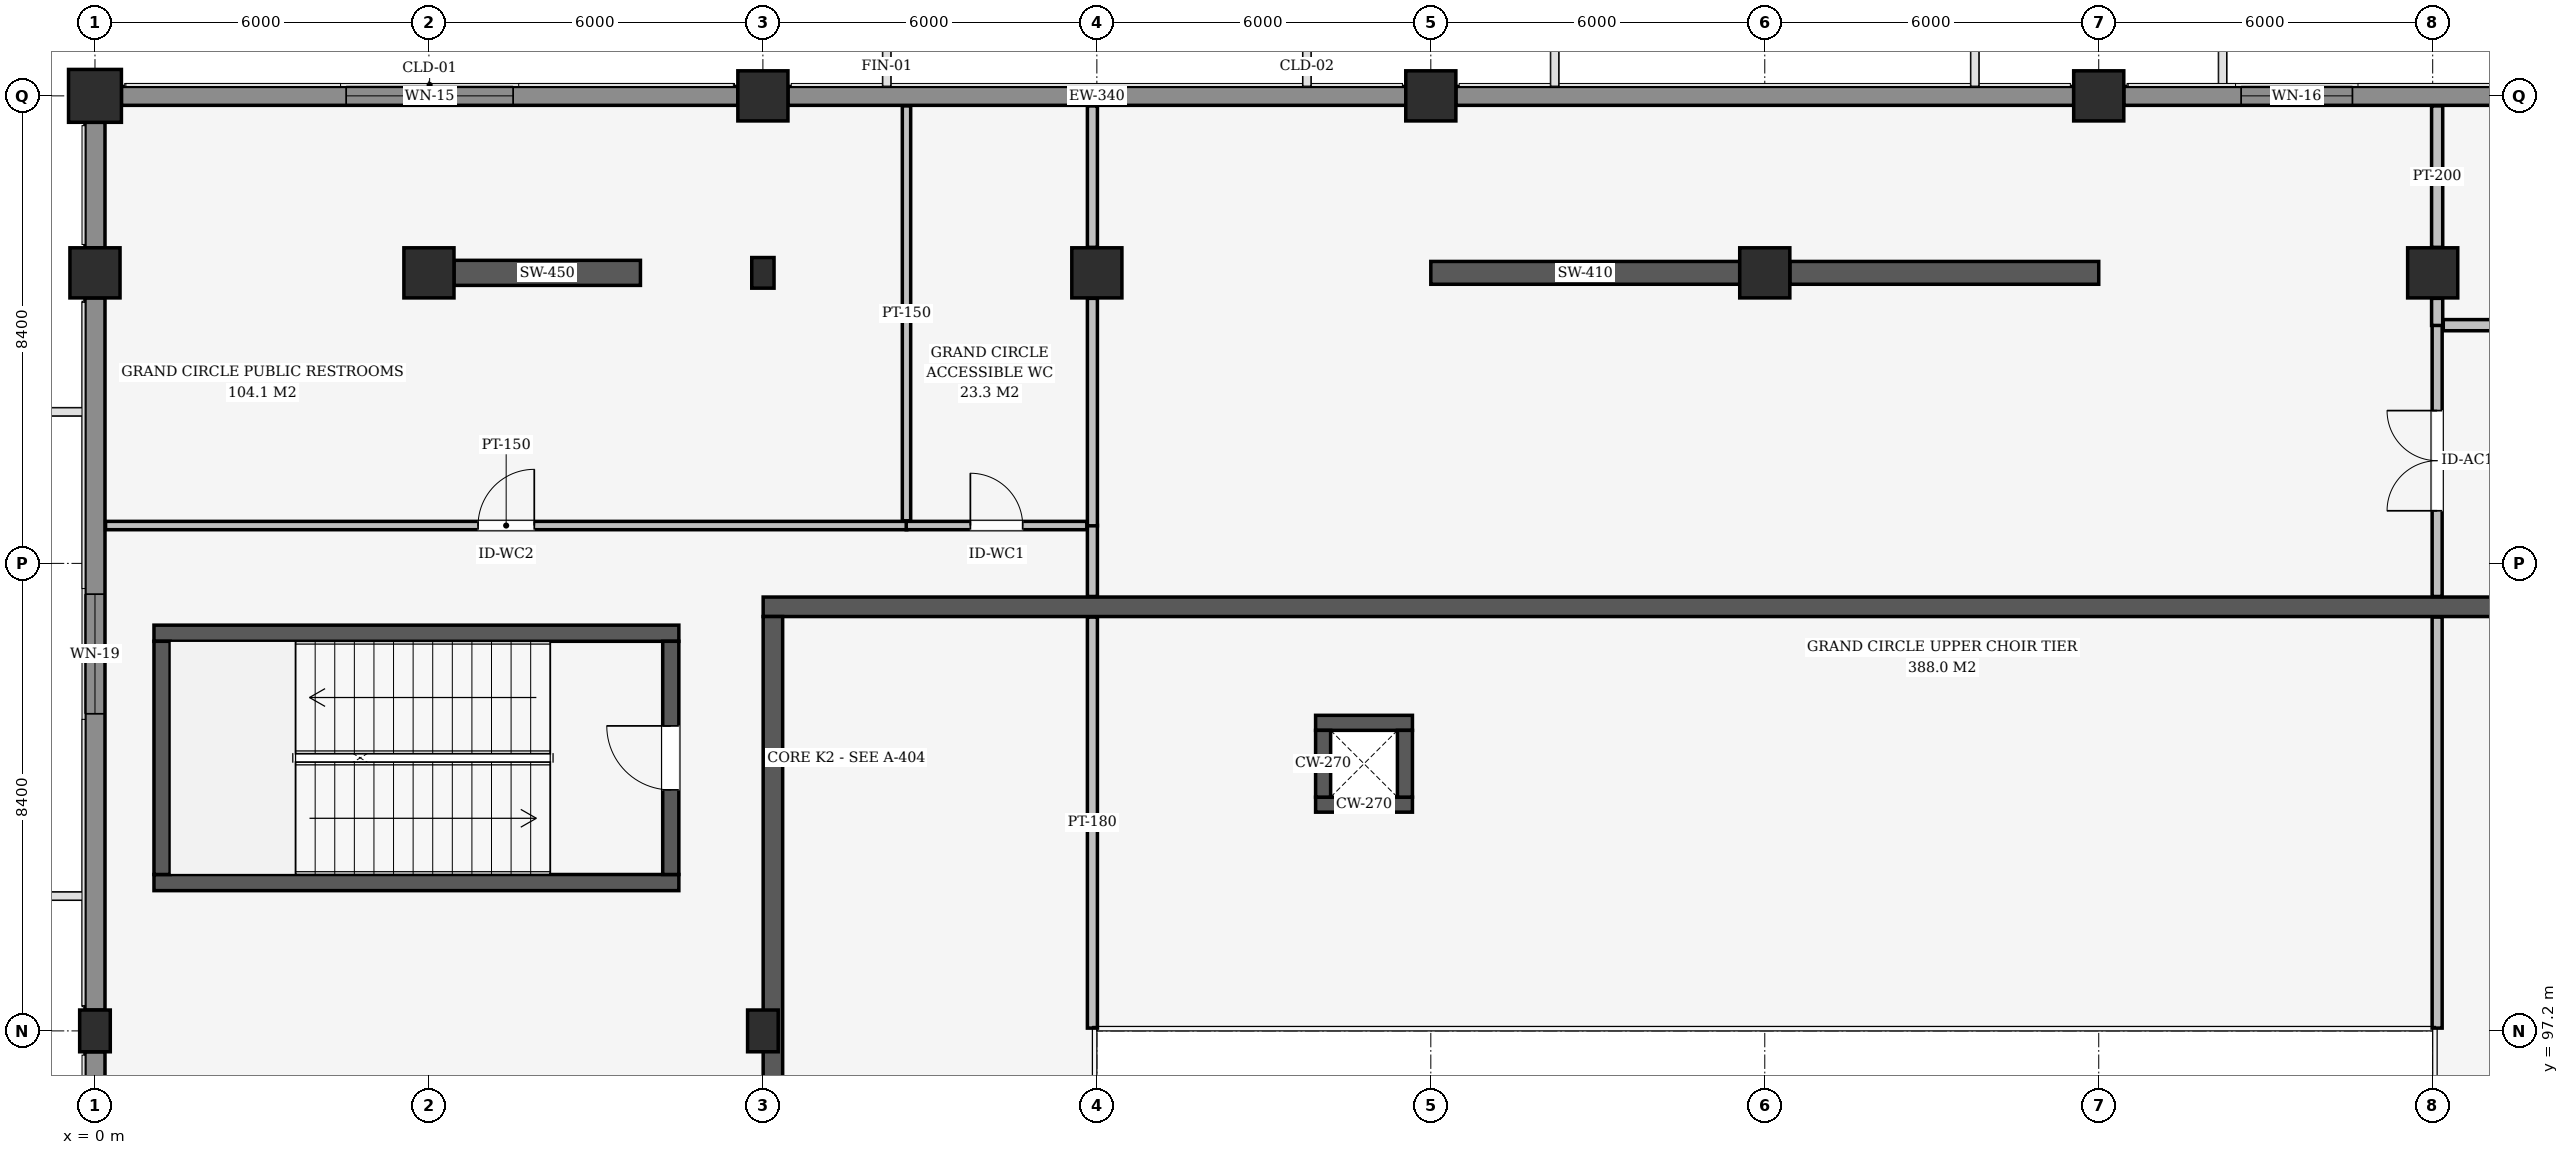
"""IFC4 building model, lengths in metres.
Left out: names, types, materials, properties, quantities, classifications, styles, units other than length and angle.
Written with IfcOpenShell. Run it as: python <this file> out.ifc"""

import sys

from ifc_helpers import new_model, si_unit, direction, frame, frame_2d, origin, origin_2d, place, context, subcontext, project, spatial, rectangle, extrude, element, fill, save


model = new_model("IFC4")
c1 = context("Model", 3, precision=1e-05, world=origin(), true_north=direction((0.0, 1.0)))
c2 = subcontext(c1, "Body", "Model", "MODEL_VIEW")
j1 = project(units=[si_unit("LENGTHUNIT", "METRE"), si_unit("PLANEANGLEUNIT", "RADIAN")], contexts=[c1])
p1 = place(None, origin())
s1 = spatial("IfcSite", under=j1, at=p1, CompositionType="ELEMENT")
p2 = place(p1, origin())
s2 = spatial("IfcBuilding", under=s1, at=p2, CompositionType="ELEMENT")
p3 = place(p2, frame((0.0, 0.0, 9.3)))
s3 = spatial("IfcBuildingStorey", under=s2, at=p3, CompositionType="ELEMENT", Elevation=9.3)
p4 = place(p3, frame((0.0, 114.0, 0.0), z_axis=(0.0, 0.0, 1.0), x_axis=(1.0, 0.0, 0.0)))
e1 = element("IfcColumn", 1, at=p4, inside=s3, PredefinedType="COLUMN", context=c2, shape_type="SweptSolid", body=[
    extrude(rectangle(XDim=0.95, YDim=0.95, at=origin_2d()), origin(), (0.0, 0.0, 1.0), 4.5),
])
for number, where, z_axis, x_axis in (
    (2, (12.0, 114.0, 0.0), (0.0, 0.0, 1.0), (1.0, 0.0, 0.0)),
    (3, (24.0, 114.0, 0.0), (0.0, 0.0, 1.0), (1.0, 0.0, 0.0)),
    (4, (36.0, 114.0, 0.0), (0.0, 0.0, 1.0), (1.0, 0.0, 0.0)),
    (5, (0.0, 110.82, 0.0), (0.0, 0.0, 1.0), (1.0, 0.0, 0.0)),
    (6, (6.0, 110.82, 0.0), (0.0, 0.0, 1.0), (1.0, 0.0, 0.0)),
    (7, (18.0, 110.82, 0.0), (0.0, 0.0, 1.0), (1.0, 0.0, 0.0)),
    (8, (30.0, 110.82, 0.0), (0.0, 0.0, 1.0), (1.0, 0.0, 0.0)),
    (9, (42.0, 110.82, 0.0), (0.0, 0.0, 1.0), (1.0, 0.0, 0.0)),
):
    element("IfcColumn", number, at=place(p3, frame(where, z_axis=z_axis, x_axis=x_axis)), inside=s3, PredefinedType="COLUMN", context=c2, shape_type="SweptSolid", body=[
        extrude(rectangle(XDim=0.9, YDim=0.9, at=origin_2d()), origin(), (0.0, 0.0, 1.0), 4.5),
    ])
for number, where, z_axis, x_axis in (
    (10, (0.0, 97.2, 0.0), (0.0, 0.0, 1.0), (1.0, 0.0, 0.0)),
    (11, (12.0, 97.2, 0.0), (0.0, 0.0, 1.0), (1.0, 0.0, 0.0)),
):
    element("IfcColumn", number, at=place(p3, frame(where, z_axis=z_axis, x_axis=x_axis)), inside=s3, PredefinedType="COLUMN", context=c2, shape_type="SweptSolid", body=[
        extrude(rectangle(XDim=0.55, YDim=0.75, at=origin_2d()), origin(), (0.0, 0.0, 1.0), 4.5),
    ])
p5 = place(p3, frame((12.0, 110.82, 0.0), z_axis=(0.0, 0.0, 1.0), x_axis=(1.0, 0.0, 0.0)))
e12 = element("IfcColumn", 12, at=p5, inside=s3, PredefinedType="PILASTER", context=c2, shape_type="SweptSolid", body=[
    extrude(rectangle(XDim=0.4, YDim=0.55, at=origin_2d()), origin(), (0.0, 0.0, 1.0), 4.5),
])
p6 = place(p3, frame((12.005, 104.82, 0.0), z_axis=(0.0, 0.0, 1.0), x_axis=(1.0, 0.0, 0.0)))
e13 = element("IfcWall", 13, at=p6, inside=s3, PredefinedType="SHEAR", context=c2, shape_type="SweptSolid", body=[
    extrude(rectangle(XDim=35.99, YDim=0.35, at=frame_2d((17.995, 0.0))), origin(), (0.0, 0.0, 1.0), 4.2),
])
p7 = place(p3, frame((12.18, 74.755, 0.0), z_axis=(0.0, 0.0, 1.0), x_axis=(0.0, 1.0, 0.0)))
e14 = element("IfcWall", 14, at=p7, inside=s3, PredefinedType="SHEAR", context=c2, shape_type="SweptSolid", body=[
    extrude(rectangle(XDim=29.89, YDim=0.35, at=frame_2d((14.945, 0.0))), origin(), (0.0, 0.0, 1.0), 4.2),
])
p8 = place(p3, frame((6.45, 110.82, 0.0), z_axis=(0.0, 0.0, 1.0), x_axis=(1.0, 0.0, 0.0)))
e15 = element("IfcWall", 15, at=p8, inside=s3, PredefinedType="SHEAR", context=c2, shape_type="SweptSolid", body=[
    extrude(rectangle(XDim=3.35, YDim=0.45, at=frame_2d((1.675, 0.0))), origin(), (0.0, 0.0, 1.0), 3.505),
])
for number, where, z_axis, x_axis in (
    (16, (24.0, 110.82, 0.0), (0.0, 0.0, 1.0), (1.0, 0.0, 0.0)),
    (17, (30.45, 110.82, 0.0), (0.0, 0.0, 1.0), (1.0, 0.0, 0.0)),
):
    element("IfcWall", number, at=place(p3, frame(where, z_axis=z_axis, x_axis=x_axis)), inside=s3, PredefinedType="SHEAR", context=c2, shape_type="SweptSolid", body=[
        extrude(rectangle(XDim=5.55, YDim=0.41, at=frame_2d((2.775, 0.0))), origin(), (0.0, 0.0, 1.0), 3.505),
    ])
p9 = place(p3, frame((0.475, 114.0, 0.0), z_axis=(0.0, 0.0, 1.0), x_axis=(1.0, 0.0, 0.0)))
e18 = element("IfcWall", 18, at=p9, inside=s3, PredefinedType="SOLIDWALL", context=c2, shape_type="SweptSolid", body=[
    extrude(rectangle(XDim=11.075, YDim=0.34, at=frame_2d((5.538, 0.0))), origin(), (0.0, 0.0, 1.0), 3.569),
])
p10 = place(p9, frame((4.038, 0.0, 0.6)))
e19 = element("IfcOpeningElement", 19, at=p10, cuts=e18, PredefinedType="OPENING", context=c2, shape_type="SweptSolid", body=[
    extrude(rectangle(XDim=3.0, YDim=2.1, at=frame_2d((1.5, 1.05))), frame((0.0, 0.18, 0.0), z_axis=(0.0, -1.0, 0.0), x_axis=(1.0, 0.0, 0.0)), (0.0, 0.0, 1.0), 0.36),
])
for number, where, z_axis, x_axis in (
    (20, (12.45, 114.0, 0.0), (0.0, 0.0, 1.0), (1.0, 0.0, 0.0)),
    (21, (24.45, 114.0, 0.0), (0.0, 0.0, 1.0), (1.0, 0.0, 0.0)),
):
    element("IfcWall", number, at=place(p3, frame(where, z_axis=z_axis, x_axis=x_axis)), inside=s3, PredefinedType="SOLIDWALL", context=c2, shape_type="SweptSolid", body=[
        extrude(rectangle(XDim=11.1, YDim=0.34, at=frame_2d((5.55, 0.0))), origin(), (0.0, 0.0, 1.0), 3.569),
    ])
p11 = place(p3, frame((36.45, 114.0, 0.0), z_axis=(0.0, 0.0, 1.0), x_axis=(1.0, 0.0, 0.0)))
e22 = element("IfcWall", 22, at=p11, inside=s3, PredefinedType="SOLIDWALL", context=c2, shape_type="SweptSolid", body=[
    extrude(rectangle(XDim=11.1, YDim=0.34, at=frame_2d((5.55, 0.0))), origin(), (0.0, 0.0, 1.0), 3.569),
])
p12 = place(p11, frame((2.108, 0.0, 0.85)))
e23 = element("IfcOpeningElement", 23, at=p12, cuts=e22, PredefinedType="OPENING", context=c2, shape_type="SweptSolid", body=[
    extrude(rectangle(XDim=2.0, YDim=1.85, at=frame_2d((1.0, 0.925))), frame((0.0, 0.18, 0.0), z_axis=(0.0, -1.0, 0.0), x_axis=(1.0, 0.0, 0.0)), (0.0, 0.0, 1.0), 0.36),
])
p13 = place(p3, frame((0.0, 83.175, 0.0), z_axis=(0.0, 0.0, 1.0), x_axis=(0.0, 1.0, 0.0)))
e24 = element("IfcWall", 24, at=p13, inside=s3, PredefinedType="SOLIDWALL", context=c2, shape_type="SweptSolid", body=[
    extrude(rectangle(XDim=13.65, YDim=0.36, at=frame_2d((6.825, 0.0))), origin(), (0.0, 0.0, 1.0), 3.569),
])
p14 = place(p3, frame((0.0, 97.575, 0.0), z_axis=(0.0, 0.0, 1.0), x_axis=(0.0, 1.0, 0.0)))
e25 = element("IfcWall", 25, at=p14, inside=s3, PredefinedType="SOLIDWALL", context=c2, shape_type="SweptSolid", body=[
    extrude(rectangle(XDim=12.795, YDim=0.36, at=frame_2d((6.397, 0.0))), origin(), (0.0, 0.0, 1.0), 3.569),
])
p15 = place(p14, frame((5.323, 0.0, 0.85)))
e26 = element("IfcOpeningElement", 26, at=p15, cuts=e25, PredefinedType="OPENING", context=c2, shape_type="SweptSolid", body=[
    extrude(rectangle(XDim=2.15, YDim=1.55, at=frame_2d((1.075, 0.775))), frame((0.0, 0.19, 0.0), z_axis=(0.0, -1.0, 0.0), x_axis=(1.0, 0.0, 0.0)), (0.0, 0.0, 1.0), 0.38),
])
p16 = place(p3, frame((0.0, 111.27, 0.0), z_axis=(0.0, 0.0, 1.0), x_axis=(0.0, 1.0, 0.0)))
e27 = element("IfcWall", 27, at=p16, inside=s3, PredefinedType="SOLIDWALL", context=c2, shape_type="SweptSolid", body=[
    extrude(rectangle(XDim=2.255, YDim=0.36, at=frame_2d((1.127, 0.0))), origin(), (0.0, 0.0, 1.0), 3.568),
])
for number, where, z_axis, x_axis in (
    (28, (21.93, 101.265, 0.0), (0.0, 0.0, 1.0), (1.0, 0.0, 0.0)),
    (29, (21.93, 102.735, 0.0), (0.0, 0.0, 1.0), (1.0, 0.0, 0.0)),
):
    element("IfcWall", number, at=place(p3, frame(where, z_axis=z_axis, x_axis=x_axis)), inside=s3, PredefinedType="SHEAR", context=c2, shape_type="SweptSolid", body=[
        extrude(rectangle(XDim=1.74, YDim=0.27, at=frame_2d((0.87, 0.0))), origin(), (0.0, 0.0, 1.0), 4.2),
    ])
for number, where, z_axis, x_axis in (
    (30, (22.065, 101.4, 0.0), (0.0, 0.0, 1.0), (0.0, 1.0, 0.0)),
    (31, (23.535, 101.4, 0.0), (0.0, 0.0, 1.0), (0.0, 1.0, 0.0)),
):
    element("IfcWall", number, at=place(p3, frame(where, z_axis=z_axis, x_axis=x_axis)), inside=s3, PredefinedType="SHEAR", context=c2, shape_type="SweptSolid", body=[
        extrude(rectangle(XDim=1.2, YDim=0.27, at=frame_2d((0.6, 0.0))), origin(), (0.0, 0.0, 1.0), 4.2),
    ])
for number, where, z_axis, x_axis in (
    (32, (1.06, 99.865, 0.0), (0.0, 0.0, 1.0), (1.0, 0.0, 0.0)),
    (33, (1.06, 104.345, 0.0), (0.0, 0.0, 1.0), (1.0, 0.0, 0.0)),
):
    element("IfcWall", number, at=place(p3, frame(where, z_axis=z_axis, x_axis=x_axis)), inside=s3, PredefinedType="SHEAR", context=c2, shape_type="SweptSolid", body=[
        extrude(rectangle(XDim=9.43, YDim=0.29, at=frame_2d((4.715, 0.0))), origin(), (0.0, 0.0, 1.0), 4.2),
    ])
p17 = place(p3, frame((1.205, 100.01, 0.0), z_axis=(0.0, 0.0, 1.0), x_axis=(0.0, 1.0, 0.0)))
e34 = element("IfcWall", 34, at=p17, inside=s3, PredefinedType="SHEAR", context=c2, shape_type="SweptSolid", body=[
    extrude(rectangle(XDim=4.19, YDim=0.29, at=frame_2d((2.095, 0.0))), origin(), (0.0, 0.0, 1.0), 4.2),
])
p18 = place(p3, frame((10.345, 100.01, 0.0), z_axis=(0.0, 0.0, 1.0), x_axis=(0.0, 1.0, 0.0)))
e35 = element("IfcWall", 35, at=p18, inside=s3, PredefinedType="SHEAR", context=c2, shape_type="SweptSolid", body=[
    extrude(rectangle(XDim=4.19, YDim=0.29, at=frame_2d((2.095, 0.0))), origin(), (0.0, 0.0, 1.0), 4.2),
])
p19 = place(p18, frame((1.52, 0.0, 0.0)))
e36 = element("IfcOpeningElement", 36, at=p19, cuts=e35, PredefinedType="OPENING", context=c2, shape_type="SweptSolid", body=[
    extrude(rectangle(XDim=1.15, YDim=2.15, at=frame_2d((0.575, 1.075))), frame((0.0, 0.155, 0.0), z_axis=(0.0, -1.0, 0.0), x_axis=(1.0, 0.0, 0.0)), (0.0, 0.0, 1.0), 0.31),
])
p20 = place(p3, frame((17.92, 97.25, 0.0), z_axis=(0.0, 0.0, 1.0), x_axis=(0.0, 1.0, 0.0)))
e37 = element("IfcWall", 37, at=p20, inside=s3, PredefinedType="PARTITIONING", context=c2, shape_type="SweptSolid", body=[
    extrude(rectangle(XDim=7.385, YDim=0.18, at=frame_2d((3.692, 0.0))), origin(), (0.0, 0.0, 1.0), 4.5),
])
p21 = place(p3, frame((17.92, 105.005, 0.0), z_axis=(0.0, 0.0, 1.0), x_axis=(0.0, 1.0, 0.0)))
e38 = element("IfcWall", 38, at=p21, inside=s3, PredefinedType="PARTITIONING", context=c2, shape_type="SweptSolid", body=[
    extrude(rectangle(XDim=1.28, YDim=0.18, at=frame_2d((0.64, 0.0))), origin(), (0.0, 0.0, 1.0), 4.5),
])
p22 = place(p3, frame((17.92, 106.275, 0.0), z_axis=(0.0, 0.0, 1.0), x_axis=(0.0, 1.0, 0.0)))
e39 = element("IfcWall", 39, at=p22, inside=s3, PredefinedType="PARTITIONING", context=c2, shape_type="SweptSolid", body=[
    extrude(rectangle(XDim=4.087, YDim=0.18, at=frame_2d((2.043, 0.0))), origin(), (0.0, 0.0, 1.0), 4.5),
])
p23 = place(p3, frame((17.92, 111.278, 0.0), z_axis=(0.0, 0.0, 1.0), x_axis=(0.0, 1.0, 0.0)))
e40 = element("IfcWall", 40, at=p23, inside=s3, PredefinedType="PARTITIONING", context=c2, shape_type="SweptSolid", body=[
    extrude(rectangle(XDim=2.542, YDim=0.18, at=frame_2d((1.271, 0.0))), origin(), (0.0, 0.0, 1.0), 4.5),
])
p24 = place(p3, frame((42.08, 97.25, 0.0), z_axis=(0.0, 0.0, 1.0), x_axis=(0.0, 1.0, 0.0)))
e41 = element("IfcWall", 41, at=p24, inside=s3, PredefinedType="PARTITIONING", context=c2, shape_type="SweptSolid", body=[
    extrude(rectangle(XDim=7.385, YDim=0.18, at=frame_2d((3.692, 0.0))), origin(), (0.0, 0.0, 1.0), 4.5),
])
p25 = place(p3, frame((42.08, 105.005, 0.0), z_axis=(0.0, 0.0, 1.0), x_axis=(0.0, 1.0, 0.0)))
e42 = element("IfcWall", 42, at=p25, inside=s3, PredefinedType="PARTITIONING", context=c2, shape_type="SweptSolid", body=[
    extrude(rectangle(XDim=4.88, YDim=0.18, at=frame_2d((2.44, 0.0))), origin(), (0.0, 0.0, 1.0), 4.5),
])
p26 = place(p25, frame((1.54, 0.0, 0.0)))
e43 = element("IfcOpeningElement", 43, at=p26, cuts=e42, PredefinedType="OPENING", context=c2, shape_type="SweptSolid", body=[
    extrude(rectangle(XDim=1.8, YDim=2.38, at=frame_2d((0.9, 1.19))), frame((0.0, 0.1, 0.0), z_axis=(0.0, -1.0, 0.0), x_axis=(1.0, 0.0, 0.0)), (0.0, 0.0, 1.0), 0.2),
])
p27 = place(p3, frame((42.08, 109.875, 0.0), z_axis=(0.0, 0.0, 1.0), x_axis=(0.0, 1.0, 0.0)))
e44 = element("IfcWall", 44, at=p27, inside=s3, PredefinedType="PARTITIONING", context=c2, shape_type="SweptSolid", body=[
    extrude(rectangle(XDim=0.487, YDim=0.2, at=frame_2d((0.244, 0.0))), origin(), (0.0, 0.0, 1.0), 4.5),
])
p28 = place(p3, frame((42.08, 111.278, 0.0), z_axis=(0.0, 0.0, 1.0), x_axis=(0.0, 1.0, 0.0)))
e45 = element("IfcWall", 45, at=p28, inside=s3, PredefinedType="PARTITIONING", context=c2, shape_type="SweptSolid", body=[
    extrude(rectangle(XDim=2.542, YDim=0.2, at=frame_2d((1.271, 0.0))), origin(), (0.0, 0.0, 1.0), 4.5),
])
p29 = place(p3, frame((0.19, 106.28, 0.0), z_axis=(0.0, 0.0, 1.0), x_axis=(1.0, 0.0, 0.0)))
e46 = element("IfcWall", 46, at=p29, inside=s3, PredefinedType="PARTITIONING", context=c2, shape_type="SweptSolid", body=[
    extrude(rectangle(XDim=14.395, YDim=0.15, at=frame_2d((7.198, 0.0))), origin(), (0.0, 0.0, 1.0), 4.18),
])
p30 = place(p29, frame((6.692, 0.0, 0.0)))
e47 = element("IfcOpeningElement", 47, at=p30, cuts=e46, PredefinedType="OPENING", context=c2, shape_type="SweptSolid", body=[
    extrude(rectangle(XDim=1.01, YDim=2.1, at=frame_2d((0.505, 1.05))), frame((0.0, 0.085, 0.0), z_axis=(0.0, -1.0, 0.0), x_axis=(1.0, 0.0, 0.0)), (0.0, 0.0, 1.0), 0.17),
])
p31 = place(p3, frame((14.575, 106.28, 0.0), z_axis=(0.0, 0.0, 1.0), x_axis=(1.0, 0.0, 0.0)))
e48 = element("IfcWall", 48, at=p31, inside=s3, PredefinedType="PARTITIONING", context=c2, shape_type="SweptSolid", body=[
    extrude(rectangle(XDim=3.245, YDim=0.15, at=frame_2d((1.623, 0.0))), origin(), (0.0, 0.0, 1.0), 4.18),
])
p32 = place(p31, frame((1.153, 0.0, 0.0)))
e49 = element("IfcOpeningElement", 49, at=p32, cuts=e48, PredefinedType="OPENING", context=c2, shape_type="SweptSolid", body=[
    extrude(rectangle(XDim=0.94, YDim=2.1, at=frame_2d((0.47, 1.05))), frame((0.0, 0.085, 0.0), z_axis=(0.0, -1.0, 0.0), x_axis=(1.0, 0.0, 0.0)), (0.0, 0.0, 1.0), 0.17),
])
p33 = place(p3, frame((14.58, 106.365, 0.0), z_axis=(0.0, 0.0, 1.0), x_axis=(0.0, 1.0, 0.0)))
e50 = element("IfcWall", 50, at=p33, inside=s3, PredefinedType="PARTITIONING", context=c2, shape_type="SweptSolid", body=[
    extrude(rectangle(XDim=7.455, YDim=0.15, at=frame_2d((3.728, 0.0))), origin(), (0.0, 0.0, 1.0), 3.723),
])
p34 = place(p3, frame((42.19, 109.88, 0.0), z_axis=(0.0, 0.0, 1.0), x_axis=(1.0, 0.0, 0.0)))
e51 = element("IfcWall", 51, at=p34, inside=s3, PredefinedType="PARTITIONING", context=c2, shape_type="SweptSolid", body=[
    extrude(rectangle(XDim=17.63, YDim=0.2, at=frame_2d((8.815, 0.0))), origin(), (0.0, 0.0, 1.0), 4.18),
])
p35 = place(p34, frame((3.848, 0.0, 0.0)))
e52 = element("IfcOpeningElement", 52, at=p35, cuts=e51, PredefinedType="OPENING", context=c2, shape_type="SweptSolid", body=[
    extrude(rectangle(XDim=1.1, YDim=2.26, at=frame_2d((0.55, 1.13))), frame((0.0, 0.11, 0.0), z_axis=(0.0, -1.0, 0.0), x_axis=(1.0, 0.0, 0.0)), (0.0, 0.0, 1.0), 0.22),
])
p36 = place(p10, origin())
e53 = element("IfcWindow", 53, at=p36, inside=s3, PartitioningType="SINGLE_PANEL", PredefinedType="WINDOW", context=c2, shape_type="SweptSolid", body=[
    extrude(rectangle(XDim=3.0, YDim=2.1, at=frame_2d((1.5, 1.05))), frame((0.0, 0.03, 0.0), z_axis=(0.0, -1.0, 0.0), x_axis=(1.0, 0.0, 0.0)), (0.0, 0.0, 1.0), 0.06),
])
fill(e19, e53)
p37 = place(p12, origin())
e54 = element("IfcWindow", 54, at=p37, inside=s3, PartitioningType="SINGLE_PANEL", PredefinedType="WINDOW", context=c2, shape_type="SweptSolid", body=[
    extrude(rectangle(XDim=2.0, YDim=1.85, at=frame_2d((1.0, 0.925))), frame((0.0, 0.03, 0.0), z_axis=(0.0, -1.0, 0.0), x_axis=(1.0, 0.0, 0.0)), (0.0, 0.0, 1.0), 0.06),
])
fill(e23, e54)
p38 = place(p15, origin())
e55 = element("IfcWindow", 55, at=p38, inside=s3, PartitioningType="SINGLE_PANEL", PredefinedType="WINDOW", context=c2, shape_type="SweptSolid", body=[
    extrude(rectangle(XDim=2.15, YDim=1.55, at=frame_2d((1.075, 0.775))), frame((0.0, 0.03, 0.0), z_axis=(0.0, -1.0, 0.0), x_axis=(1.0, 0.0, 0.0)), (0.0, 0.0, 1.0), 0.06),
])
fill(e26, e55)
p39 = place(p19, origin())
e56 = element("IfcDoor", 56, at=p39, inside=s3, OperationType="SINGLE_SWING_RIGHT", PredefinedType="DOOR", context=c2, shape_type="SweptSolid", body=[
    extrude(rectangle(XDim=1.15, YDim=2.15, at=frame_2d((0.575, 1.075))), frame((0.0, 0.025, 0.0), z_axis=(0.0, -1.0, 0.0), x_axis=(1.0, 0.0, 0.0)), (0.0, 0.0, 1.0), 0.05),
])
fill(e36, e56)
p40 = place(p26, origin())
e57 = element("IfcDoor", 57, at=p40, inside=s3, OperationType="DOUBLE_DOOR_SINGLE_SWING", PredefinedType="DOOR", context=c2, shape_type="SweptSolid", body=[
    extrude(rectangle(XDim=1.8, YDim=2.38, at=frame_2d((0.9, 1.19))), frame((0.0, 0.025, 0.0), z_axis=(0.0, -1.0, 0.0), x_axis=(1.0, 0.0, 0.0)), (0.0, 0.0, 1.0), 0.05),
])
fill(e43, e57)
p41 = place(p30, origin())
e58 = element("IfcDoor", 58, at=p41, inside=s3, OperationType="SINGLE_SWING_RIGHT", PredefinedType="DOOR", context=c2, shape_type="SweptSolid", body=[
    extrude(rectangle(XDim=1.01, YDim=2.1, at=frame_2d((0.505, 1.05))), frame((0.0, 0.025, 0.0), z_axis=(0.0, -1.0, 0.0), x_axis=(1.0, 0.0, 0.0)), (0.0, 0.0, 1.0), 0.05),
])
fill(e47, e58)
p42 = place(p32, origin())
e59 = element("IfcDoor", 59, at=p42, inside=s3, OperationType="SINGLE_SWING_LEFT", PredefinedType="DOOR", context=c2, shape_type="SweptSolid", body=[
    extrude(rectangle(XDim=0.94, YDim=2.1, at=frame_2d((0.47, 1.05))), frame((0.0, 0.025, 0.0), z_axis=(0.0, -1.0, 0.0), x_axis=(1.0, 0.0, 0.0)), (0.0, 0.0, 1.0), 0.05),
])
fill(e49, e59)
save(model, sys.argv[1])
